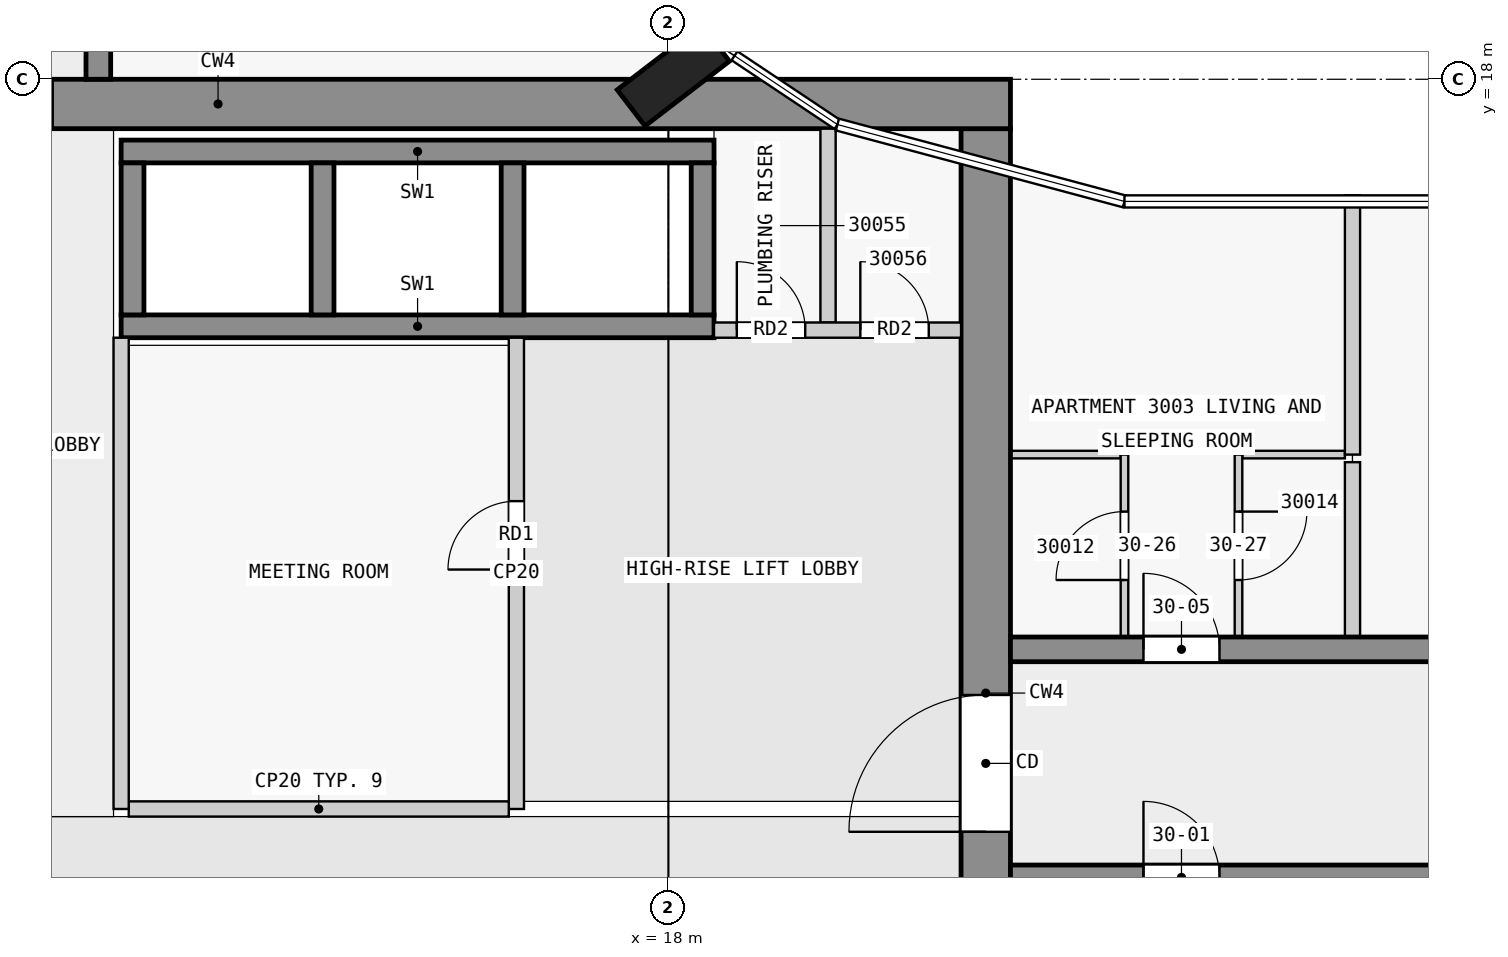
"""IFC4 building model, lengths in metres.
Left out: names, types, materials, properties, quantities, classifications, styles, units other than length and angle.
Written with IfcOpenShell. Run it as: python <this file> out.ifc"""

import sys

from ifc_helpers import new_model, si_unit, direction, frame, frame_2d, origin, origin_2d, place, context, subcontext, project, spatial, rectangle, extrude, element, fill, save


model = new_model("IFC4")
c1 = context("Model", 3, precision=1e-05, world=origin(), true_north=direction((0.0, 1.0)))
c2 = subcontext(c1, "Body", "Model", "MODEL_VIEW")
j1 = project(units=[si_unit("LENGTHUNIT", "METRE"), si_unit("PLANEANGLEUNIT", "RADIAN")], contexts=[c1])
p1 = place(None, origin())
s1 = spatial("IfcSite", under=j1, at=p1, CompositionType="ELEMENT")
p2 = place(p1, origin())
s2 = spatial("IfcBuilding", under=s1, at=p2, CompositionType="ELEMENT")
p3 = place(p2, frame((0.0, 0.0, 116.8)))
s3 = spatial("IfcBuildingStorey", under=s2, at=p3, CompositionType="ELEMENT", Elevation=116.8)
p4 = place(p3, frame((18.065, 18.05, 0.0), z_axis=(0.0, 0.0, 1.0), x_axis=(-0.608810846443, 0.793315418515, 0.0)))
e1 = element("IfcColumn", 1, at=p4, inside=s3, PredefinedType="COLUMN", context=c2, shape_type="SweptSolid", body=[
    extrude(rectangle(XDim=0.6, YDim=1.4, at=origin_2d()), origin(), (0.0, 0.0, 1.0), 3.5),
])
p5 = place(p3, frame((1.65, 17.675, 0.0), z_axis=(0.0, 0.0, 1.0), x_axis=(1.0, 0.0, 0.0)))
e2 = element("IfcWall", 2, at=p5, inside=s3, PredefinedType="SHEAR", context=c2, shape_type="SweptSolid", body=[
    extrude(rectangle(XDim=20.85, YDim=0.65, at=frame_2d((10.425, 0.0))), origin(), (0.0, 0.0, 1.0), 3.25),
])
p6 = place(p5, frame((6.45, 0.0, 0.0)))
e3 = element("IfcOpeningElement", 3, at=p6, cuts=e2, PredefinedType="OPENING", context=c2, shape_type="SweptSolid", body=[
    extrude(rectangle(XDim=1.8, YDim=2.1, at=frame_2d((0.9, 1.05))), frame((0.0, 0.335, 0.0), z_axis=(0.0, -1.0, 0.0), x_axis=(1.0, 0.0, 0.0)), (0.0, 0.0, 1.0), 0.67),
])
p7 = place(p3, frame((22.175, 2.5, 0.0), z_axis=(0.0, 0.0, 1.0), x_axis=(0.0, 1.0, 0.0)))
e4 = element("IfcWall", 4, at=p7, inside=s3, PredefinedType="SHEAR", context=c2, shape_type="SweptSolid", body=[
    extrude(rectangle(XDim=14.85, YDim=0.65, at=frame_2d((7.425, 0.0))), origin(), (0.0, 0.0, 1.0), 3.25),
])
p8 = place(p7, frame((5.6, 0.0, 0.0)))
e5 = element("IfcOpeningElement", 5, at=p8, cuts=e4, PredefinedType="OPENING", context=c2, shape_type="SweptSolid", body=[
    extrude(rectangle(XDim=1.8, YDim=2.1, at=frame_2d((0.9, 1.05))), frame((0.0, 0.335, 0.0), z_axis=(0.0, -1.0, 0.0), x_axis=(1.0, 0.0, 0.0)), (0.0, 0.0, 1.0), 0.67),
])
for number, where, z_axis, x_axis in (
    (6, (10.8, 17.05, 0.0), (0.0, 0.0, 1.0), (1.0, 0.0, 0.0)),
    (7, (10.8, 14.75, 0.0), (0.0, 0.0, 1.0), (1.0, 0.0, 0.0)),
):
    element("IfcWall", number, at=place(p3, frame(where, z_axis=z_axis, x_axis=x_axis)), inside=s3, PredefinedType="SHEAR", context=c2, shape_type="SweptSolid", body=[
        extrude(rectangle(XDim=7.8, YDim=0.3, at=frame_2d((3.9, 0.0))), origin(), (0.0, 0.0, 1.0), 3.25),
    ])
for number, where, z_axis, x_axis in (
    (8, (10.95, 14.9, 0.0), (0.0, 0.0, 1.0), (0.0, 1.0, 0.0)),
    (9, (13.45, 14.9, 0.0), (0.0, 0.0, 1.0), (0.0, 1.0, 0.0)),
    (10, (15.95, 14.9, 0.0), (0.0, 0.0, 1.0), (0.0, 1.0, 0.0)),
    (11, (18.45, 14.9, 0.0), (0.0, 0.0, 1.0), (0.0, 1.0, 0.0)),
):
    element("IfcWall", number, at=place(p3, frame(where, z_axis=z_axis, x_axis=x_axis)), inside=s3, PredefinedType="SHEAR", context=c2, shape_type="SweptSolid", body=[
        extrude(rectangle(XDim=2.0, YDim=0.3, at=frame_2d((1.0, 0.0))), origin(), (0.0, 0.0, 1.0), 3.25),
    ])
p9 = place(p3, frame((22.5, 7.5, 0.0), z_axis=(0.0, 0.0, 1.0), x_axis=(1.0, 0.0, 0.0)))
e12 = element("IfcWall", 12, at=p9, inside=s3, PredefinedType="SHEAR", context=c2, shape_type="SweptSolid", body=[
    extrude(rectangle(XDim=22.5, YDim=0.325, at=frame_2d((11.25, 0.0))), origin(), (0.0, 0.0, 1.0), 3.25),
])
p10 = place(p9, frame((1.75, 0.0, 0.0)))
e13 = element("IfcOpeningElement", 13, at=p10, cuts=e12, PredefinedType="OPENING", context=c2, shape_type="SweptSolid", body=[
    extrude(rectangle(XDim=1.0, YDim=2.1, at=frame_2d((0.5, 1.05))), frame((0.0, 0.172, 0.0), z_axis=(0.0, -1.0, 0.0), x_axis=(1.0, 0.0, 0.0)), (0.0, 0.0, 1.0), 0.345),
])
p11 = place(p9, frame((6.25, 0.0, 0.0)))
e14 = element("IfcOpeningElement", 14, at=p11, cuts=e12, PredefinedType="OPENING", context=c2, shape_type="SweptSolid", body=[
    extrude(rectangle(XDim=1.0, YDim=2.1, at=frame_2d((0.5, 1.05))), frame((0.0, 0.172, 0.0), z_axis=(0.0, -1.0, 0.0), x_axis=(1.0, 0.0, 0.0)), (0.0, 0.0, 1.0), 0.345),
])
p12 = place(p9, frame((10.75, 0.0, 0.0)))
e15 = element("IfcOpeningElement", 15, at=p12, cuts=e12, PredefinedType="OPENING", context=c2, shape_type="SweptSolid", body=[
    extrude(rectangle(XDim=1.0, YDim=2.1, at=frame_2d((0.5, 1.05))), frame((0.0, 0.172, 0.0), z_axis=(0.0, -1.0, 0.0), x_axis=(1.0, 0.0, 0.0)), (0.0, 0.0, 1.0), 0.345),
])
p13 = place(p9, frame((16.85, 0.0, 0.0)))
e16 = element("IfcOpeningElement", 16, at=p13, cuts=e12, PredefinedType="OPENING", context=c2, shape_type="SweptSolid", body=[
    extrude(rectangle(XDim=1.0, YDim=2.1, at=frame_2d((0.5, 1.05))), frame((0.0, 0.172, 0.0), z_axis=(0.0, -1.0, 0.0), x_axis=(1.0, 0.0, 0.0)), (0.0, 0.0, 1.0), 0.345),
])
p14 = place(p3, frame((22.5, 10.5, 0.0), z_axis=(0.0, 0.0, 1.0), x_axis=(1.0, 0.0, 0.0)))
e17 = element("IfcWall", 17, at=p14, inside=s3, PredefinedType="SHEAR", context=c2, shape_type="SweptSolid", body=[
    extrude(rectangle(XDim=22.5, YDim=0.325, at=frame_2d((11.25, 0.0))), origin(), (0.0, 0.0, 1.0), 3.25),
])
p15 = place(p14, frame((1.75, 0.0, 0.0)))
e18 = element("IfcOpeningElement", 18, at=p15, cuts=e17, PredefinedType="OPENING", context=c2, shape_type="SweptSolid", body=[
    extrude(rectangle(XDim=1.0, YDim=2.1, at=frame_2d((0.5, 1.05))), frame((0.0, 0.172, 0.0), z_axis=(0.0, -1.0, 0.0), x_axis=(1.0, 0.0, 0.0)), (0.0, 0.0, 1.0), 0.345),
])
p16 = place(p14, frame((8.55, 0.0, 0.0)))
e19 = element("IfcOpeningElement", 19, at=p16, cuts=e17, PredefinedType="OPENING", context=c2, shape_type="SweptSolid", body=[
    extrude(rectangle(XDim=1.0, YDim=2.1, at=frame_2d((0.5, 1.05))), frame((0.0, 0.172, 0.0), z_axis=(0.0, -1.0, 0.0), x_axis=(1.0, 0.0, 0.0)), (0.0, 0.0, 1.0), 0.345),
])
p17 = place(p14, frame((15.25, 0.0, 0.0)))
e20 = element("IfcOpeningElement", 20, at=p17, cuts=e17, PredefinedType="OPENING", context=c2, shape_type="SweptSolid", body=[
    extrude(rectangle(XDim=1.0, YDim=2.1, at=frame_2d((0.5, 1.05))), frame((0.0, 0.172, 0.0), z_axis=(0.0, -1.0, 0.0), x_axis=(1.0, 0.0, 0.0)), (0.0, 0.0, 1.0), 0.345),
])
p18 = place(p14, frame((18.75, 0.0, 0.0)))
e21 = element("IfcOpeningElement", 21, at=p18, cuts=e17, PredefinedType="OPENING", context=c2, shape_type="SweptSolid", body=[
    extrude(rectangle(XDim=0.9, YDim=2.1, at=frame_2d((0.45, 1.05))), frame((0.0, 0.172, 0.0), z_axis=(0.0, -1.0, 0.0), x_axis=(1.0, 0.0, 0.0)), (0.0, 0.0, 1.0), 0.345),
])
p19 = place(p14, frame((20.95, 0.0, 0.0)))
e22 = element("IfcOpeningElement", 22, at=p19, cuts=e17, PredefinedType="OPENING", context=c2, shape_type="SweptSolid", body=[
    extrude(rectangle(XDim=1.0, YDim=2.1, at=frame_2d((0.5, 1.05))), frame((0.0, 0.172, 0.0), z_axis=(0.0, -1.0, 0.0), x_axis=(1.0, 0.0, 0.0)), (0.0, 0.0, 1.0), 0.345),
])
p20 = place(p3, frame((10.5, 18.0, 0.0), z_axis=(0.0, 0.0, 1.0), x_axis=(0.0, 1.0, 0.0)))
e23 = element("IfcWall", 23, at=p20, inside=s3, PredefinedType="SHEAR", context=c2, shape_type="SweptSolid", body=[
    extrude(rectangle(XDim=27.0, YDim=0.325, at=frame_2d((13.5, 0.0))), origin(), (0.0, 0.0, 1.0), 3.25),
])
p21 = place(p20, frame((1.75, 0.0, 0.0)))
e24 = element("IfcOpeningElement", 24, at=p21, cuts=e23, PredefinedType="OPENING", context=c2, shape_type="SweptSolid", body=[
    extrude(rectangle(XDim=1.0, YDim=2.1, at=frame_2d((0.5, 1.05))), frame((0.0, 0.172, 0.0), z_axis=(0.0, -1.0, 0.0), x_axis=(1.0, 0.0, 0.0)), (0.0, 0.0, 1.0), 0.345),
])
p22 = place(p20, frame((6.25, 0.0, 0.0)))
e25 = element("IfcOpeningElement", 25, at=p22, cuts=e23, PredefinedType="OPENING", context=c2, shape_type="SweptSolid", body=[
    extrude(rectangle(XDim=1.0, YDim=2.1, at=frame_2d((0.5, 1.05))), frame((0.0, 0.172, 0.0), z_axis=(0.0, -1.0, 0.0), x_axis=(1.0, 0.0, 0.0)), (0.0, 0.0, 1.0), 0.345),
])
p23 = place(p20, frame((13.05, 0.0, 0.0)))
e26 = element("IfcOpeningElement", 26, at=p23, cuts=e23, PredefinedType="OPENING", context=c2, shape_type="SweptSolid", body=[
    extrude(rectangle(XDim=1.0, YDim=2.1, at=frame_2d((0.5, 1.05))), frame((0.0, 0.172, 0.0), z_axis=(0.0, -1.0, 0.0), x_axis=(1.0, 0.0, 0.0)), (0.0, 0.0, 1.0), 0.345),
])
p24 = place(p20, frame((19.75, 0.0, 0.0)))
e27 = element("IfcOpeningElement", 27, at=p24, cuts=e23, PredefinedType="OPENING", context=c2, shape_type="SweptSolid", body=[
    extrude(rectangle(XDim=1.0, YDim=2.1, at=frame_2d((0.5, 1.05))), frame((0.0, 0.172, 0.0), z_axis=(0.0, -1.0, 0.0), x_axis=(1.0, 0.0, 0.0)), (0.0, 0.0, 1.0), 0.345),
])
p25 = place(p20, frame((23.25, 0.0, 0.0)))
e28 = element("IfcOpeningElement", 28, at=p25, cuts=e23, PredefinedType="OPENING", context=c2, shape_type="SweptSolid", body=[
    extrude(rectangle(XDim=0.9, YDim=2.1, at=frame_2d((0.45, 1.05))), frame((0.0, 0.172, 0.0), z_axis=(0.0, -1.0, 0.0), x_axis=(1.0, 0.0, 0.0)), (0.0, 0.0, 1.0), 0.345),
])
p26 = place(p20, frame((25.45, 0.0, 0.0)))
e29 = element("IfcOpeningElement", 29, at=p26, cuts=e23, PredefinedType="OPENING", context=c2, shape_type="SweptSolid", body=[
    extrude(rectangle(XDim=1.0, YDim=2.1, at=frame_2d((0.5, 1.05))), frame((0.0, 0.172, 0.0), z_axis=(0.0, -1.0, 0.0), x_axis=(1.0, 0.0, 0.0)), (0.0, 0.0, 1.0), 0.345),
])
p27 = place(p3, frame((10.8, 8.4, 0.0), z_axis=(0.0, 0.0, 1.0), x_axis=(0.0, 1.0, 0.0)))
e30 = element("IfcWall", 30, at=p27, inside=s3, PredefinedType="PARTITIONING", context=c2, shape_type="SweptSolid", body=[
    extrude(rectangle(XDim=6.2, YDim=0.2, at=frame_2d((3.1, 0.0))), origin(), (0.0, 0.0, 1.0), 3.25),
])
p28 = place(p3, frame((10.9, 8.4, 0.0), z_axis=(0.0, 0.0, 1.0), x_axis=(1.0, 0.0, 0.0)))
e31 = element("IfcWall", 31, at=p28, inside=s3, PredefinedType="PARTITIONING", context=c2, shape_type="SweptSolid", body=[
    extrude(rectangle(XDim=5.0, YDim=0.2, at=frame_2d((2.5, 0.0))), origin(), (0.0, 0.0, 1.0), 3.25),
])
p29 = place(p3, frame((16.0, 8.4, 0.0), z_axis=(0.0, 0.0, 1.0), x_axis=(0.0, 1.0, 0.0)))
e32 = element("IfcWall", 32, at=p29, inside=s3, PredefinedType="PARTITIONING", context=c2, shape_type="SweptSolid", body=[
    extrude(rectangle(XDim=6.2, YDim=0.2, at=frame_2d((3.1, 0.0))), origin(), (0.0, 0.0, 1.0), 3.25),
])
p30 = place(p29, frame((3.15, 0.0, 0.0)))
e33 = element("IfcOpeningElement", 33, at=p30, cuts=e32, PredefinedType="OPENING", context=c2, shape_type="SweptSolid", body=[
    extrude(rectangle(XDim=0.9, YDim=2.1, at=frame_2d((0.45, 1.05))), frame((0.0, 0.11, 0.0), z_axis=(0.0, -1.0, 0.0), x_axis=(1.0, 0.0, 0.0)), (0.0, 0.0, 1.0), 0.22),
])
p31 = place(p3, frame((18.6, 14.7, 0.0), z_axis=(0.0, 0.0, 1.0), x_axis=(1.0, 0.0, 0.0)))
e34 = element("IfcWall", 34, at=p31, inside=s3, PredefinedType="PARTITIONING", context=c2, shape_type="SweptSolid", body=[
    extrude(rectangle(XDim=3.25, YDim=0.2, at=frame_2d((1.625, 0.0))), origin(), (0.0, 0.0, 1.0), 3.25),
])
p32 = place(p31, frame((0.3, 0.0, 0.0)))
e35 = element("IfcOpeningElement", 35, at=p32, cuts=e34, PredefinedType="OPENING", context=c2, shape_type="SweptSolid", body=[
    extrude(rectangle(XDim=0.9, YDim=2.1, at=frame_2d((0.45, 1.05))), frame((0.0, 0.11, 0.0), z_axis=(0.0, -1.0, 0.0), x_axis=(1.0, 0.0, 0.0)), (0.0, 0.0, 1.0), 0.22),
])
p33 = place(p31, frame((1.925, 0.0, 0.0)))
e36 = element("IfcOpeningElement", 36, at=p33, cuts=e34, PredefinedType="OPENING", context=c2, shape_type="SweptSolid", body=[
    extrude(rectangle(XDim=0.9, YDim=2.1, at=frame_2d((0.45, 1.05))), frame((0.0, 0.11, 0.0), z_axis=(0.0, -1.0, 0.0), x_axis=(1.0, 0.0, 0.0)), (0.0, 0.0, 1.0), 0.22),
])
p34 = place(p3, frame((20.1, 14.8, 0.0), z_axis=(0.0, 0.0, 1.0), x_axis=(0.0, 1.0, 0.0)))
e37 = element("IfcWall", 37, at=p34, inside=s3, PredefinedType="PARTITIONING", context=c2, shape_type="SweptSolid", body=[
    extrude(rectangle(XDim=2.55, YDim=0.2, at=frame_2d((1.275, 0.0))), origin(), (0.0, 0.0, 1.0), 3.25),
])
p35 = place(p3, frame((23.95, 13.062, 0.0), z_axis=(0.0, 0.0, 1.0), x_axis=(-1.0, 0.0, 0.0)))
e38 = element("IfcWall", 38, at=p35, inside=s3, PredefinedType="PARTITIONING", context=c2, shape_type="SweptSolid", body=[
    extrude(rectangle(XDim=1.45, YDim=0.1, at=frame_2d((0.725, 0.0))), origin(), (0.0, 0.0, 1.0), 3.25),
])
p36 = place(p3, frame((26.9, 13.062, 0.0), z_axis=(0.0, 0.0, 1.0), x_axis=(-1.0, 0.0, 0.0)))
e39 = element("IfcWall", 39, at=p36, inside=s3, PredefinedType="PARTITIONING", context=c2, shape_type="SweptSolid", body=[
    extrude(rectangle(XDim=1.35, YDim=0.1, at=frame_2d((0.675, 0.0))), origin(), (0.0, 0.0, 1.0), 3.25),
])
p37 = place(p3, frame((24.0, 10.663, 0.0), z_axis=(0.0, 0.0, 1.0), x_axis=(0.0, 1.0, 0.0)))
e40 = element("IfcWall", 40, at=p37, inside=s3, PredefinedType="PARTITIONING", context=c2, shape_type="SweptSolid", body=[
    extrude(rectangle(XDim=2.4, YDim=0.1, at=frame_2d((1.2, 0.0))), origin(), (0.0, 0.0, 1.0), 3.25),
])
p38 = place(p37, frame((0.75, 0.0, 0.0)))
e41 = element("IfcOpeningElement", 41, at=p38, cuts=e40, PredefinedType="OPENING", context=c2, shape_type="SweptSolid", body=[
    extrude(rectangle(XDim=0.9, YDim=2.1, at=frame_2d((0.45, 1.05))), frame((0.0, 0.06, 0.0), z_axis=(0.0, -1.0, 0.0), x_axis=(1.0, 0.0, 0.0)), (0.0, 0.0, 1.0), 0.12),
])
p39 = place(p3, frame((25.5, 13.062, 0.0), z_axis=(0.0, 0.0, 1.0), x_axis=(0.0, -1.0, 0.0)))
e42 = element("IfcWall", 42, at=p39, inside=s3, PredefinedType="PARTITIONING", context=c2, shape_type="SweptSolid", body=[
    extrude(rectangle(XDim=2.4, YDim=0.1, at=frame_2d((1.2, 0.0))), origin(), (0.0, 0.0, 1.0), 3.25),
])
p40 = place(p39, frame((0.75, 0.0, 0.0)))
e43 = element("IfcOpeningElement", 43, at=p40, cuts=e42, PredefinedType="OPENING", context=c2, shape_type="SweptSolid", body=[
    extrude(rectangle(XDim=0.9, YDim=2.1, at=frame_2d((0.45, 1.05))), frame((0.0, 0.06, 0.0), z_axis=(0.0, -1.0, 0.0), x_axis=(1.0, 0.0, 0.0)), (0.0, 0.0, 1.0), 0.12),
])
p41 = place(p3, frame((27.0, 16.473, 0.0), z_axis=(0.0, 0.0, 1.0), x_axis=(0.0, -1.0, 0.0)))
e44 = element("IfcWall", 44, at=p41, inside=s3, PredefinedType="PARTITIONING", context=c2, shape_type="SweptSolid", body=[
    extrude(rectangle(XDim=3.411, YDim=0.2, at=frame_2d((1.705, 0.0))), origin(), (0.0, 0.0, 1.0), 3.25),
])
p42 = place(p3, frame((27.0, 10.663, 0.0), z_axis=(0.0, 0.0, 1.0), x_axis=(0.0, 1.0, 0.0)))
e45 = element("IfcWall", 45, at=p42, inside=s3, PredefinedType="PARTITIONING", context=c2, shape_type="SweptSolid", body=[
    extrude(rectangle(XDim=2.3, YDim=0.2, at=frame_2d((1.15, 0.0))), origin(), (0.0, 0.0, 1.0), 3.25),
])
p43 = place(p30, origin())
e46 = element("IfcDoor", 46, at=p43, inside=s3, OperationType="SINGLE_SWING_LEFT", PredefinedType="DOOR", context=c2, shape_type="SweptSolid", body=[
    extrude(rectangle(XDim=0.9, YDim=2.1, at=frame_2d((0.45, 1.05))), frame((0.0, 0.025, 0.0), z_axis=(0.0, -1.0, 0.0), x_axis=(1.0, 0.0, 0.0)), (0.0, 0.0, 1.0), 0.05),
])
fill(e33, e46)
p44 = place(p8, origin())
e47 = element("IfcDoor", 47, at=p44, inside=s3, OperationType="DOUBLE_DOOR_SINGLE_SWING", PredefinedType="DOOR", context=c2, shape_type="SweptSolid", body=[
    extrude(rectangle(XDim=1.8, YDim=2.1, at=frame_2d((0.9, 1.05))), frame((0.0, 0.025, 0.0), z_axis=(0.0, -1.0, 0.0), x_axis=(1.0, 0.0, 0.0)), (0.0, 0.0, 1.0), 0.05),
])
fill(e5, e47)
p45 = place(p32, origin())
e48 = element("IfcDoor", 48, at=p45, inside=s3, OperationType="SINGLE_SWING_LEFT", PredefinedType="DOOR", context=c2, shape_type="SweptSolid", body=[
    extrude(rectangle(XDim=0.9, YDim=2.1, at=frame_2d((0.45, 1.05))), frame((0.0, 0.025, 0.0), z_axis=(0.0, -1.0, 0.0), x_axis=(1.0, 0.0, 0.0)), (0.0, 0.0, 1.0), 0.05),
])
fill(e35, e48)
p46 = place(p33, origin())
e49 = element("IfcDoor", 49, at=p46, inside=s3, OperationType="SINGLE_SWING_LEFT", PredefinedType="DOOR", context=c2, shape_type="SweptSolid", body=[
    extrude(rectangle(XDim=0.9, YDim=2.1, at=frame_2d((0.45, 1.05))), frame((0.0, 0.025, 0.0), z_axis=(0.0, -1.0, 0.0), x_axis=(1.0, 0.0, 0.0)), (0.0, 0.0, 1.0), 0.05),
])
fill(e36, e49)
p47 = place(p10, origin())
e50 = element("IfcDoor", 50, at=p47, inside=s3, OperationType="SINGLE_SWING_LEFT", PredefinedType="DOOR", context=c2, shape_type="SweptSolid", body=[
    extrude(rectangle(XDim=1.0, YDim=2.1, at=frame_2d((0.5, 1.05))), frame((0.0, 0.025, 0.0), z_axis=(0.0, -1.0, 0.0), x_axis=(1.0, 0.0, 0.0)), (0.0, 0.0, 1.0), 0.05),
])
fill(e13, e50)
p48 = place(p15, origin())
e51 = element("IfcDoor", 51, at=p48, inside=s3, OperationType="SINGLE_SWING_LEFT", PredefinedType="DOOR", context=c2, shape_type="SweptSolid", body=[
    extrude(rectangle(XDim=1.0, YDim=2.1, at=frame_2d((0.5, 1.05))), frame((0.0, 0.025, 0.0), z_axis=(0.0, -1.0, 0.0), x_axis=(1.0, 0.0, 0.0)), (0.0, 0.0, 1.0), 0.05),
])
fill(e18, e51)
p49 = place(p38, origin())
e52 = element("IfcDoor", 52, at=p49, inside=s3, OperationType="SINGLE_SWING_LEFT", PredefinedType="DOOR", context=c2, shape_type="SweptSolid", body=[
    extrude(rectangle(XDim=0.9, YDim=2.1, at=frame_2d((0.45, 1.05))), frame((0.0, 0.025, 0.0), z_axis=(0.0, -1.0, 0.0), x_axis=(1.0, 0.0, 0.0)), (0.0, 0.0, 1.0), 0.05),
])
fill(e41, e52)
p50 = place(p40, origin())
e53 = element("IfcDoor", 53, at=p50, inside=s3, OperationType="SINGLE_SWING_LEFT", PredefinedType="DOOR", context=c2, shape_type="SweptSolid", body=[
    extrude(rectangle(XDim=0.9, YDim=2.1, at=frame_2d((0.45, 1.05))), frame((0.0, 0.025, 0.0), z_axis=(0.0, -1.0, 0.0), x_axis=(1.0, 0.0, 0.0)), (0.0, 0.0, 1.0), 0.05),
])
fill(e43, e53)
save(model, sys.argv[1])
